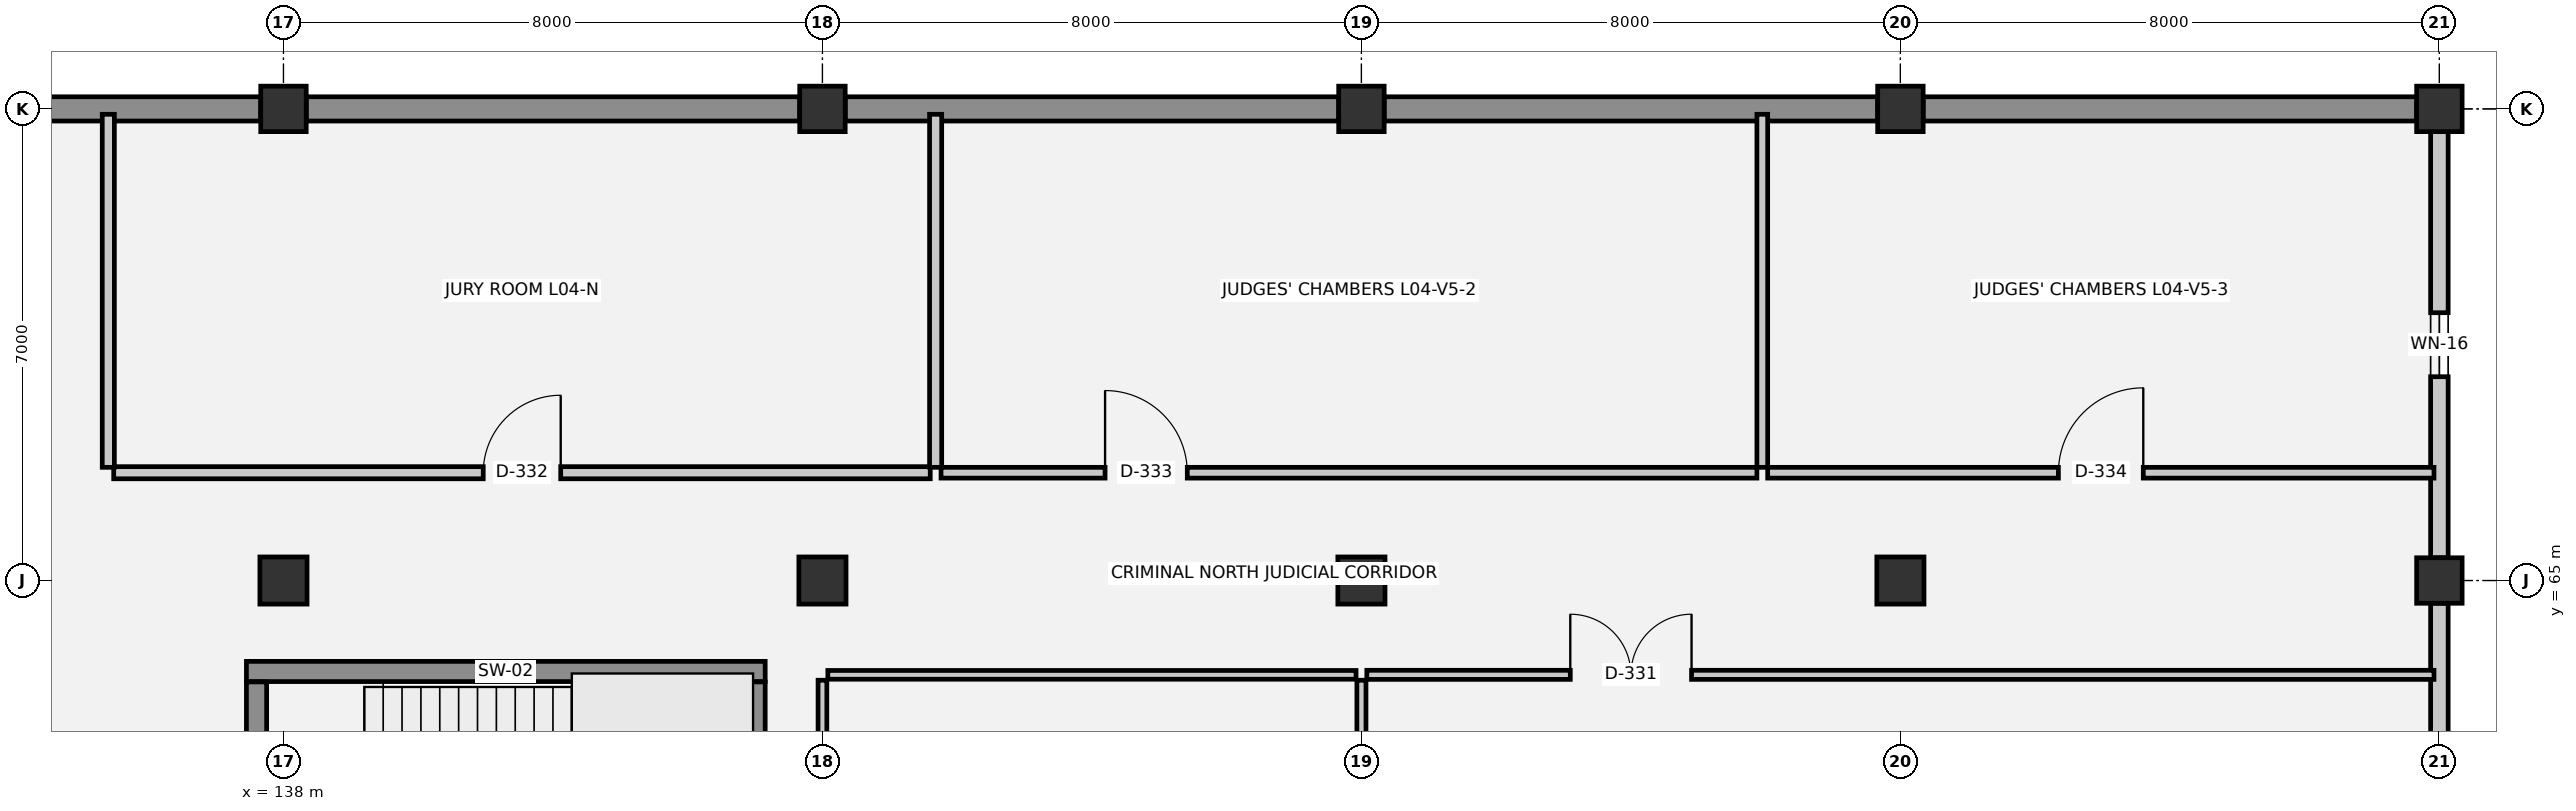
"""IFC4 building model, lengths in metres.
Left out: names, types, materials, properties, quantities, classifications, styles, units other than length and angle.
Written with IfcOpenShell. Run it as: python <this file> out.ifc"""

import sys

from ifc_helpers import new_model, si_unit, direction, frame, frame_2d, origin, origin_2d, place, context, subcontext, project, spatial, rectangle, extrude, element, fill, save


model = new_model("IFC4")
c1 = context("Model", 3, precision=1e-05, world=origin(), true_north=direction((0.0, 1.0)))
c2 = subcontext(c1, "Body", "Model", "MODEL_VIEW")
j1 = project(units=[si_unit("LENGTHUNIT", "METRE"), si_unit("PLANEANGLEUNIT", "RADIAN")], contexts=[c1])
p1 = place(None, origin())
s1 = spatial("IfcSite", under=j1, at=p1, CompositionType="ELEMENT")
p2 = place(p1, origin())
s2 = spatial("IfcBuilding", under=s1, at=p2, CompositionType="ELEMENT")
p3 = place(p2, frame((0.0, 0.0, 14.4)))
s3 = spatial("IfcBuildingStorey", under=s2, at=p3, CompositionType="ELEMENT", Elevation=14.4)
p4 = place(p3, frame((138.0, 65.0, 0.0), z_axis=(0.0, 0.0, 1.0), x_axis=(1.0, 0.0, 0.0)))
e1 = element("IfcColumn", 1, at=p4, inside=s3, PredefinedType="COLUMN", context=c2, shape_type="SweptSolid", body=[
    extrude(rectangle(XDim=0.7, YDim=0.7, at=origin_2d()), origin(), (0.0, 0.0, 1.0), 3.9),
])
p5 = place(p3, frame((138.0, 72.0, 0.0), z_axis=(0.0, 0.0, 1.0), x_axis=(1.0, 0.0, 0.0)))
e2 = element("IfcColumn", 2, at=p5, inside=s3, PredefinedType="COLUMN", context=c2, shape_type="SweptSolid", body=[
    extrude(rectangle(XDim=0.675, YDim=0.675, at=origin_2d()), origin(), (0.0, 0.0, 1.0), 3.9),
])
p6 = place(p3, frame((146.0, 65.0, 0.0), z_axis=(0.0, 0.0, 1.0), x_axis=(1.0, 0.0, 0.0)))
e3 = element("IfcColumn", 3, at=p6, inside=s3, PredefinedType="COLUMN", context=c2, shape_type="SweptSolid", body=[
    extrude(rectangle(XDim=0.7, YDim=0.7, at=origin_2d()), origin(), (0.0, 0.0, 1.0), 3.9),
])
p7 = place(p3, frame((146.0, 72.0, 0.0), z_axis=(0.0, 0.0, 1.0), x_axis=(1.0, 0.0, 0.0)))
e4 = element("IfcColumn", 4, at=p7, inside=s3, PredefinedType="COLUMN", context=c2, shape_type="SweptSolid", body=[
    extrude(rectangle(XDim=0.675, YDim=0.675, at=origin_2d()), origin(), (0.0, 0.0, 1.0), 3.9),
])
p8 = place(p3, frame((154.0, 65.0, 0.0), z_axis=(0.0, 0.0, 1.0), x_axis=(1.0, 0.0, 0.0)))
e5 = element("IfcColumn", 5, at=p8, inside=s3, PredefinedType="COLUMN", context=c2, shape_type="SweptSolid", body=[
    extrude(rectangle(XDim=0.7, YDim=0.7, at=origin_2d()), origin(), (0.0, 0.0, 1.0), 3.9),
])
p9 = place(p3, frame((154.0, 72.0, 0.0), z_axis=(0.0, 0.0, 1.0), x_axis=(1.0, 0.0, 0.0)))
e6 = element("IfcColumn", 6, at=p9, inside=s3, PredefinedType="COLUMN", context=c2, shape_type="SweptSolid", body=[
    extrude(rectangle(XDim=0.675, YDim=0.675, at=origin_2d()), origin(), (0.0, 0.0, 1.0), 3.9),
])
p10 = place(p3, frame((162.0, 65.0, 0.0), z_axis=(0.0, 0.0, 1.0), x_axis=(1.0, 0.0, 0.0)))
e7 = element("IfcColumn", 7, at=p10, inside=s3, PredefinedType="COLUMN", context=c2, shape_type="SweptSolid", body=[
    extrude(rectangle(XDim=0.7, YDim=0.7, at=origin_2d()), origin(), (0.0, 0.0, 1.0), 3.9),
])
for number, where, z_axis, x_axis in (
    (8, (162.0, 72.0, 0.0), (0.0, 0.0, 1.0), (1.0, 0.0, 0.0)),
    (9, (170.0, 65.0, 0.0), (0.0, 0.0, 1.0), (1.0, 0.0, 0.0)),
    (10, (170.0, 72.0, 0.0), (0.0, 0.0, 1.0), (1.0, 0.0, 0.0)),
):
    element("IfcColumn", number, at=place(p3, frame(where, z_axis=z_axis, x_axis=x_axis)), inside=s3, PredefinedType="COLUMN", context=c2, shape_type="SweptSolid", body=[
        extrude(rectangle(XDim=0.675, YDim=0.675, at=origin_2d()), origin(), (0.0, 0.0, 1.0), 3.9),
    ])
for number, where, z_axis, x_axis in (
    (11, (130.337, 72.0, 0.0), (0.0, 0.0, 1.0), (1.0, 0.0, 0.0)),
    (12, (138.337, 72.0, 0.0), (0.0, 0.0, 1.0), (1.0, 0.0, 0.0)),
    (13, (146.337, 72.0, 0.0), (0.0, 0.0, 1.0), (1.0, 0.0, 0.0)),
    (14, (154.337, 72.0, 0.0), (0.0, 0.0, 1.0), (1.0, 0.0, 0.0)),
    (15, (162.337, 72.0, 0.0), (0.0, 0.0, 1.0), (1.0, 0.0, 0.0)),
):
    element("IfcWall", number, at=place(p3, frame(where, z_axis=z_axis, x_axis=x_axis)), inside=s3, PredefinedType="SOLIDWALL", context=c2, shape_type="SweptSolid", body=[
        extrude(rectangle(XDim=7.325, YDim=0.36, at=frame_2d((3.663, 0.0))), origin(), (0.0, 0.0, 1.0), 3.62),
    ])
p11 = place(p3, frame((170.0, 71.663, 0.0), z_axis=(0.0, 0.0, 1.0), x_axis=(0.0, -1.0, 0.0)))
e16 = element("IfcWall", 16, at=p11, inside=s3, PredefinedType="SOLIDWALL", context=c2, shape_type="SweptSolid", body=[
    extrude(rectangle(XDim=6.325, YDim=0.26, at=frame_2d((3.163, 0.0))), origin(), (0.0, 0.0, 1.0), 2.61),
])
p12 = place(p11, frame((2.688, 0.0, 1.0)))
e17 = element("IfcOpeningElement", 17, at=p12, cuts=e16, PredefinedType="OPENING", context=c2, shape_type="SweptSolid", body=[
    extrude(rectangle(XDim=0.95, YDim=1.1, at=frame_2d((0.475, 0.55))), frame((0.0, 0.14, 0.0), z_axis=(0.0, -1.0, 0.0), x_axis=(1.0, 0.0, 0.0)), (0.0, 0.0, 1.0), 0.28),
])
p13 = place(p3, frame((170.0, 64.663, 0.0), z_axis=(0.0, 0.0, 1.0), x_axis=(0.0, -1.0, 0.0)))
e18 = element("IfcWall", 18, at=p13, inside=s3, PredefinedType="SOLIDWALL", context=c2, shape_type="SweptSolid", body=[
    extrude(rectangle(XDim=13.325, YDim=0.26, at=frame_2d((6.663, 0.0))), origin(), (0.0, 0.0, 1.0), 2.61),
])
p14 = place(p13, frame((6.188, 0.0, 1.0)))
e19 = element("IfcOpeningElement", 19, at=p14, cuts=e18, PredefinedType="OPENING", context=c2, shape_type="SweptSolid", body=[
    extrude(rectangle(XDim=0.95, YDim=1.1, at=frame_2d((0.475, 0.55))), frame((0.0, 0.14, 0.0), z_axis=(0.0, -1.0, 0.0), x_axis=(1.0, 0.0, 0.0)), (0.0, 0.0, 1.0), 0.28),
])
p15 = place(p3, frame((145.15, 63.65, 0.0), z_axis=(0.0, 0.0, 1.0), x_axis=(-1.0, 0.0, 0.0)))
e20 = element("IfcWall", 20, at=p15, inside=s3, PredefinedType="SHEAR", context=c2, shape_type="SweptSolid", body=[
    extrude(rectangle(XDim=7.7, YDim=0.3, at=frame_2d((3.85, 0.0))), origin(), (0.0, 0.0, 1.0), 3.62),
])
for number, where, z_axis, x_axis in (
    (21, (137.6, 63.495, 0.0), (0.0, 0.0, 1.0), (0.0, -1.0, 0.0)),
    (22, (145.0, 59.505, 0.0), (0.0, 0.0, 1.0), (0.0, 1.0, 0.0)),
):
    element("IfcWall", number, at=place(p3, frame(where, z_axis=z_axis, x_axis=x_axis)), inside=s3, PredefinedType="SHEAR", context=c2, shape_type="SweptSolid", body=[
        extrude(rectangle(XDim=3.99, YDim=0.3, at=frame_2d((1.995, 0.0))), origin(), (0.0, 0.0, 1.0), 3.62),
    ])
p16 = place(p3, frame((146.08, 63.6, 0.0), z_axis=(0.0, 0.0, 1.0), x_axis=(1.0, 0.0, 0.0)))
e23 = element("IfcWall", 23, at=p16, inside=s3, PredefinedType="PARTITIONING", context=c2, shape_type="SweptSolid", body=[
    extrude(rectangle(XDim=7.84, YDim=0.13, at=frame_2d((3.92, 0.0))), origin(), (0.0, 0.0, 1.0), 3.54),
])
p17 = place(p3, frame((154.08, 63.6, 0.0), z_axis=(0.0, 0.0, 1.0), x_axis=(1.0, 0.0, 0.0)))
e24 = element("IfcWall", 24, at=p17, inside=s3, PredefinedType="PARTITIONING", context=c2, shape_type="SweptSolid", body=[
    extrude(rectangle(XDim=15.84, YDim=0.135, at=frame_2d((7.92, 0.0))), origin(), (0.0, 0.0, 1.0), 3.54),
])
p18 = place(p17, frame((3.02, 0.0, 0.0)))
e25 = element("IfcOpeningElement", 25, at=p18, cuts=e24, PredefinedType="OPENING", context=c2, shape_type="SweptSolid", body=[
    extrude(rectangle(XDim=1.8, YDim=2.3, at=frame_2d((0.9, 1.15))), frame((0.0, 0.077, 0.0), z_axis=(0.0, -1.0, 0.0), x_axis=(1.0, 0.0, 0.0)), (0.0, 0.0, 1.0), 0.155),
])
p19 = place(p3, frame((135.48, 66.6, 0.0), z_axis=(0.0, 0.0, 1.0), x_axis=(1.0, 0.0, 0.0)))
e26 = element("IfcWall", 26, at=p19, inside=s3, PredefinedType="PARTITIONING", context=c2, shape_type="SweptSolid", body=[
    extrude(rectangle(XDim=12.12, YDim=0.18, at=frame_2d((6.06, 0.0))), origin(), (0.0, 0.0, 1.0), 3.54),
])
p20 = place(p19, frame((5.485, 0.0, 0.0)))
e27 = element("IfcOpeningElement", 27, at=p20, cuts=e26, PredefinedType="OPENING", context=c2, shape_type="SweptSolid", body=[
    extrude(rectangle(XDim=1.15, YDim=2.2, at=frame_2d((0.575, 1.1))), frame((0.0, 0.1, 0.0), z_axis=(0.0, -1.0, 0.0), x_axis=(1.0, 0.0, 0.0)), (0.0, 0.0, 1.0), 0.2),
])
p21 = place(p3, frame((147.76, 66.6, 0.0), z_axis=(0.0, 0.0, 1.0), x_axis=(1.0, 0.0, 0.0)))
e28 = element("IfcWall", 28, at=p21, inside=s3, PredefinedType="PARTITIONING", context=c2, shape_type="SweptSolid", body=[
    extrude(rectangle(XDim=12.11, YDim=0.16, at=frame_2d((6.055, 0.0))), origin(), (0.0, 0.0, 1.0), 3.54),
])
p22 = place(p21, frame((2.435, 0.0, 0.0)))
e29 = element("IfcOpeningElement", 29, at=p22, cuts=e28, PredefinedType="OPENING", context=c2, shape_type="SweptSolid", body=[
    extrude(rectangle(XDim=1.22, YDim=2.2, at=frame_2d((0.61, 1.1))), frame((0.0, 0.09, 0.0), z_axis=(0.0, -1.0, 0.0), x_axis=(1.0, 0.0, 0.0)), (0.0, 0.0, 1.0), 0.18),
])
p23 = place(p3, frame((160.03, 66.6, 0.0), z_axis=(0.0, 0.0, 1.0), x_axis=(1.0, 0.0, 0.0)))
e30 = element("IfcWall", 30, at=p23, inside=s3, PredefinedType="PARTITIONING", context=c2, shape_type="SweptSolid", body=[
    extrude(rectangle(XDim=9.89, YDim=0.16, at=frame_2d((4.945, 0.0))), origin(), (0.0, 0.0, 1.0), 3.54),
])
p24 = place(p23, frame((4.315, 0.0, 0.0)))
e31 = element("IfcOpeningElement", 31, at=p24, cuts=e30, PredefinedType="OPENING", context=c2, shape_type="SweptSolid", body=[
    extrude(rectangle(XDim=1.26, YDim=2.2, at=frame_2d((0.63, 1.1))), frame((0.0, 0.09, 0.0), z_axis=(0.0, -1.0, 0.0), x_axis=(1.0, 0.0, 0.0)), (0.0, 0.0, 1.0), 0.18),
])
p25 = place(p3, frame((135.4, 66.68, 0.0), z_axis=(0.0, 0.0, 1.0), x_axis=(0.0, 1.0, 0.0)))
e32 = element("IfcWall", 32, at=p25, inside=s3, PredefinedType="PARTITIONING", context=c2, shape_type="SweptSolid", body=[
    extrude(rectangle(XDim=5.24, YDim=0.18, at=frame_2d((2.62, 0.0))), origin(), (0.0, 0.0, 1.0), 3.54),
])
p26 = place(p3, frame((146.0, 51.35, 0.0), z_axis=(0.0, 0.0, 1.0), x_axis=(0.0, 1.0, 0.0)))
e33 = element("IfcWall", 33, at=p26, inside=s3, PredefinedType="PARTITIONING", context=c2, shape_type="SweptSolid", body=[
    extrude(rectangle(XDim=12.17, YDim=0.13, at=frame_2d((6.085, 0.0))), origin(), (0.0, 0.0, 1.0), 2.63),
])
p27 = place(p26, frame((5.185, 0.0, 0.0)))
e34 = element("IfcOpeningElement", 34, at=p27, cuts=e33, PredefinedType="OPENING", context=c2, shape_type="SweptSolid", body=[
    extrude(rectangle(XDim=1.8, YDim=2.3, at=frame_2d((0.9, 1.15))), frame((0.0, 0.075, 0.0), z_axis=(0.0, -1.0, 0.0), x_axis=(1.0, 0.0, 0.0)), (0.0, 0.0, 1.0), 0.15),
])
p28 = place(p3, frame((147.68, 66.68, 0.0), z_axis=(0.0, 0.0, 1.0), x_axis=(0.0, 1.0, 0.0)))
e35 = element("IfcWall", 35, at=p28, inside=s3, PredefinedType="PARTITIONING", context=c2, shape_type="SweptSolid", body=[
    extrude(rectangle(XDim=5.24, YDim=0.18, at=frame_2d((2.62, 0.0))), origin(), (0.0, 0.0, 1.0), 3.54),
])
p29 = place(p3, frame((154.0, 51.08, 0.0), z_axis=(0.0, 0.0, 1.0), x_axis=(0.0, 1.0, 0.0)))
e36 = element("IfcWall", 36, at=p29, inside=s3, PredefinedType="PARTITIONING", context=c2, shape_type="SweptSolid", body=[
    extrude(rectangle(XDim=12.44, YDim=0.135, at=frame_2d((6.22, 0.0))), origin(), (0.0, 0.0, 1.0), 2.63),
])
p30 = place(p3, frame((159.95, 66.68, 0.0), z_axis=(0.0, 0.0, 1.0), x_axis=(0.0, 1.0, 0.0)))
e37 = element("IfcWall", 37, at=p30, inside=s3, PredefinedType="PARTITIONING", context=c2, shape_type="SweptSolid", body=[
    extrude(rectangle(XDim=5.24, YDim=0.16, at=frame_2d((2.62, 0.0))), origin(), (0.0, 0.0, 1.0), 3.54),
])
p31 = place(p12, origin())
e38 = element("IfcWindow", 38, at=p31, inside=s3, PartitioningType="SINGLE_PANEL", PredefinedType="WINDOW", context=c2, shape_type="SweptSolid", body=[
    extrude(rectangle(XDim=0.95, YDim=1.1, at=frame_2d((0.475, 0.55))), frame((0.0, 0.03, 0.0), z_axis=(0.0, -1.0, 0.0), x_axis=(1.0, 0.0, 0.0)), (0.0, 0.0, 1.0), 0.06),
])
fill(e17, e38)
p32 = place(p18, origin())
e39 = element("IfcDoor", 39, at=p32, inside=s3, OperationType="DOUBLE_DOOR_SINGLE_SWING", PredefinedType="DOOR", context=c2, shape_type="SweptSolid", body=[
    extrude(rectangle(XDim=1.8, YDim=2.3, at=frame_2d((0.9, 1.15))), frame((0.0, 0.025, 0.0), z_axis=(0.0, -1.0, 0.0), x_axis=(1.0, 0.0, 0.0)), (0.0, 0.0, 1.0), 0.05),
])
fill(e25, e39)
p33 = place(p20, origin())
e40 = element("IfcDoor", 40, at=p33, inside=s3, OperationType="SINGLE_SWING_RIGHT", PredefinedType="DOOR", context=c2, shape_type="SweptSolid", body=[
    extrude(rectangle(XDim=1.15, YDim=2.2, at=frame_2d((0.575, 1.1))), frame((0.0, 0.025, 0.0), z_axis=(0.0, -1.0, 0.0), x_axis=(1.0, 0.0, 0.0)), (0.0, 0.0, 1.0), 0.05),
])
fill(e27, e40)
p34 = place(p22, origin())
e41 = element("IfcDoor", 41, at=p34, inside=s3, OperationType="SINGLE_SWING_LEFT", PredefinedType="DOOR", context=c2, shape_type="SweptSolid", body=[
    extrude(rectangle(XDim=1.22, YDim=2.2, at=frame_2d((0.61, 1.1))), frame((0.0, 0.025, 0.0), z_axis=(0.0, -1.0, 0.0), x_axis=(1.0, 0.0, 0.0)), (0.0, 0.0, 1.0), 0.05),
])
fill(e29, e41)
p35 = place(p24, origin())
e42 = element("IfcDoor", 42, at=p35, inside=s3, OperationType="SINGLE_SWING_RIGHT", PredefinedType="DOOR", context=c2, shape_type="SweptSolid", body=[
    extrude(rectangle(XDim=1.26, YDim=2.2, at=frame_2d((0.63, 1.1))), frame((0.0, 0.025, 0.0), z_axis=(0.0, -1.0, 0.0), x_axis=(1.0, 0.0, 0.0)), (0.0, 0.0, 1.0), 0.05),
])
fill(e31, e42)
save(model, sys.argv[1])
